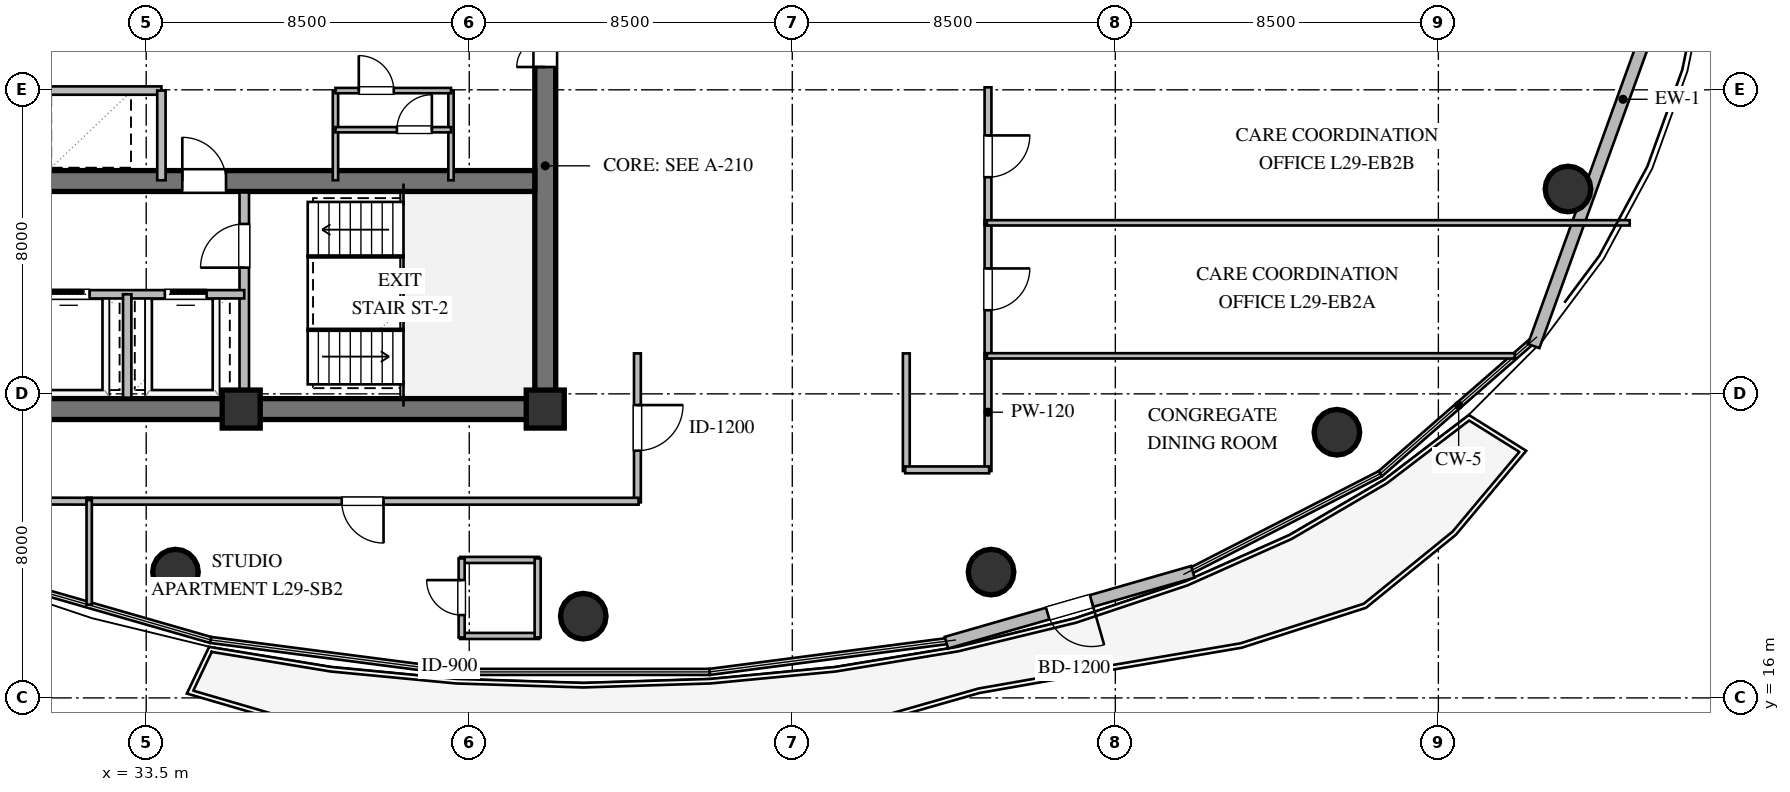
"""IFC4 building model, lengths in metres.
Left out: names, types, materials, properties, quantities, classifications, styles, units other than length and angle.
Written with IfcOpenShell. Run it as: python <this file> out.ifc"""

import sys

from ifc_helpers import new_model, si_unit, direction, frame, frame_2d, origin, origin_2d, place, context, subcontext, project, spatial, rectangle, circle, extrude, element, fill, save


model = new_model("IFC4")
c1 = context("Model", 3, precision=1e-05, world=origin(), true_north=direction((0.0, 1.0)))
c2 = subcontext(c1, "Body", "Model", "MODEL_VIEW")
j1 = project(units=[si_unit("LENGTHUNIT", "METRE"), si_unit("PLANEANGLEUNIT", "RADIAN")], contexts=[c1])
p1 = place(None, origin())
s1 = spatial("IfcSite", under=j1, at=p1, CompositionType="ELEMENT")
p2 = place(p1, origin())
s2 = spatial("IfcBuilding", under=s1, at=p2, CompositionType="ELEMENT")
p3 = place(p2, frame((0.0, 0.0, 113.4)))
s3 = spatial("IfcBuildingStorey", under=s2, at=p3, CompositionType="ELEMENT", Elevation=113.4)
p4 = place(p3, frame((21.725, 23.6, 0.0), z_axis=(0.0, 0.0, 1.0), x_axis=(1.0, 0.0, 0.0)))
e1 = element("IfcWall", 1, at=p4, inside=s3, PredefinedType="SHEAR", context=c2, shape_type="SweptSolid", body=[
    extrude(rectangle(XDim=22.55, YDim=0.55, at=frame_2d((11.275, 0.0))), origin(), (0.0, 0.0, 1.0), 3.36),
])
p5 = place(p3, frame((44.0, 23.875, 0.0), z_axis=(0.0, 0.0, 1.0), x_axis=(0.0, 1.0, 0.0)))
e2 = element("IfcWall", 2, at=p5, inside=s3, PredefinedType="SHEAR", context=c2, shape_type="SweptSolid", body=[
    extrude(rectangle(XDim=12.25, YDim=0.55, at=frame_2d((6.125, 0.0))), origin(), (0.0, 0.0, 1.0), 3.36),
])
p6 = place(p5, frame((8.725, 0.0, 0.0)))
e3 = element("IfcOpeningElement", 3, at=p6, cuts=e2, PredefinedType="OPENING", context=c2, shape_type="SweptSolid", body=[
    extrude(rectangle(XDim=1.5, YDim=2.15, at=frame_2d((0.75, 1.075))), frame((0.0, 0.285, 0.0), z_axis=(0.0, -1.0, 0.0), x_axis=(1.0, 0.0, 0.0)), (0.0, 0.0, 1.0), 0.57),
])
p7 = place(p3, frame((22.275, 29.6, 0.0), z_axis=(0.0, 0.0, 1.0), x_axis=(1.0, 0.0, 0.0)))
e4 = element("IfcWall", 4, at=p7, inside=s3, PredefinedType="SHEAR", context=c2, shape_type="SweptSolid", body=[
    extrude(rectangle(XDim=21.45, YDim=0.55, at=frame_2d((10.725, 0.0))), origin(), (0.0, 0.0, 1.0), 3.36),
])
p8 = place(p7, frame((12.175, 0.0, 0.0)))
e5 = element("IfcOpeningElement", 5, at=p8, cuts=e4, PredefinedType="OPENING", context=c2, shape_type="SweptSolid", body=[
    extrude(rectangle(XDim=1.15, YDim=2.1, at=frame_2d((0.575, 1.05))), frame((0.0, 0.285, 0.0), z_axis=(0.0, -1.0, 0.0), x_axis=(1.0, 0.0, 0.0)), (0.0, 0.0, 1.0), 0.57),
])
for number, where, z_axis, x_axis in (
    (6, (36.0, 23.6, 0.0), (0.0, 0.0, 1.0), (1.0, 0.0, 0.0)),
    (7, (44.0, 23.6, 0.0), (0.0, 0.0, 1.0), (1.0, 0.0, 0.0)),
):
    element("IfcColumn", number, at=place(p3, frame(where, z_axis=z_axis, x_axis=x_axis)), inside=s3, PredefinedType="COLUMN", context=c2, shape_type="SweptSolid", body=[
        extrude(rectangle(XDim=1.0, YDim=1.0, at=origin_2d()), origin(), (0.0, 0.0, 1.0), 3.6),
    ])
for number, where, z_axis, x_axis in (
    (8, (34.27, 19.31, 0.0), (0.0, 0.0, 1.0), (1.0, 0.0, 0.0)),
    (9, (45.0, 18.15, 0.0), (0.0, 0.0, 1.0), (1.0, 0.0, 0.0)),
    (10, (55.73, 19.31, 0.0), (0.0, 0.0, 1.0), (1.0, 0.0, 0.0)),
    (11, (64.83, 22.99, 0.0), (0.0, 0.0, 1.0), (1.0, 0.0, 0.0)),
    (12, (70.91, 29.39, 0.0), (0.0, 0.0, 1.0), (1.0, 0.0, 0.0)),
):
    element("IfcColumn", number, at=place(p3, frame(where, z_axis=z_axis, x_axis=x_axis)), inside=s3, PredefinedType="COLUMN", context=c2, shape_type="SweptSolid", body=[
        extrude(circle(Radius=0.6, at=origin_2d()), origin(), (0.0, 0.0, 1.0), 3.6),
    ])
p9 = place(p3, frame((74.708, 38.244, 0.0), z_axis=(0.0, 0.0, 1.0), x_axis=(-0.340324669139, -0.94030799187, 0.0)))
e13 = element("IfcWall", 13, at=p9, inside=s3, PredefinedType="STANDARD", context=c2, shape_type="SweptSolid", body=[
    extrude(rectangle(XDim=13.81, YDim=0.32, at=frame_2d((6.905, 0.0))), origin(), (0.0, 0.0, 1.0), 3.36),
])
p10 = place(p3, frame((61.039, 19.317, 0.0), z_axis=(0.0, 0.0, 1.0), x_axis=(-0.96106509915, -0.276322049784, 0.0)))
e14 = element("IfcWall", 14, at=p10, inside=s3, PredefinedType="STANDARD", context=c2, shape_type="SweptSolid", body=[
    extrude(rectangle(XDim=6.746, YDim=0.32, at=frame_2d((3.373, 0.0))), origin(), (0.0, 0.0, 1.0), 3.36),
])
p11 = place(p10, frame((2.773, 0.0, 0.0)))
e15 = element("IfcOpeningElement", 15, at=p11, cuts=e14, PredefinedType="OPENING", context=c2, shape_type="SweptSolid", body=[
    extrude(rectangle(XDim=1.2, YDim=2.15, at=frame_2d((0.6, 1.075))), frame((0.0, 0.17, 0.0), z_axis=(0.0, -1.0, 0.0), x_axis=(1.0, 0.0, 0.0)), (0.0, 0.0, 1.0), 0.34),
])
p12 = place(p3, frame((36.08, 23.9, 0.0), z_axis=(0.0, 0.0, 1.0), x_axis=(0.0, 1.0, 0.0)))
e16 = element("IfcWall", 16, at=p12, inside=s3, PredefinedType="SOLIDWALL", context=c2, shape_type="SweptSolid", body=[
    extrude(rectangle(XDim=5.4, YDim=0.25, at=frame_2d((2.7, 0.0))), origin(), (0.0, 0.0, 1.0), 3.36),
])
p13 = place(p12, frame((3.421, 0.0, 0.0)))
e17 = element("IfcOpeningElement", 17, at=p13, cuts=e16, PredefinedType="OPENING", context=c2, shape_type="SweptSolid", body=[
    extrude(rectangle(XDim=1.15, YDim=2.1, at=frame_2d((0.575, 1.05))), frame((0.0, 0.135, 0.0), z_axis=(0.0, -1.0, 0.0), x_axis=(1.0, 0.0, 0.0)), (0.0, 0.0, 1.0), 0.27),
])
p14 = place(p3, frame((29.92, 26.62, 0.0), z_axis=(0.0, 0.0, 1.0), x_axis=(1.0, 0.0, 0.0)))
e18 = element("IfcWall", 18, at=p14, inside=s3, PredefinedType="SOLIDWALL", context=c2, shape_type="SweptSolid", body=[
    extrude(rectangle(XDim=6.16, YDim=0.22, at=frame_2d((3.08, 0.0))), origin(), (0.0, 0.0, 1.0), 3.36),
])
p15 = place(p14, frame((0.99, 0.0, 0.0)))
e19 = element("IfcOpeningElement", 19, at=p15, cuts=e18, PredefinedType="OPENING", context=c2, shape_type="SweptSolid", body=[
    extrude(rectangle(XDim=1.1, YDim=2.1, at=frame_2d((0.55, 1.05))), frame((0.0, 0.12, 0.0), z_axis=(0.0, -1.0, 0.0), x_axis=(1.0, 0.0, 0.0)), (0.0, 0.0, 1.0), 0.24),
])
p16 = place(p14, frame((4.07, 0.0, 0.0)))
e20 = element("IfcOpeningElement", 20, at=p16, cuts=e18, PredefinedType="OPENING", context=c2, shape_type="SweptSolid", body=[
    extrude(rectangle(XDim=1.1, YDim=2.1, at=frame_2d((0.55, 1.05))), frame((0.0, 0.12, 0.0), z_axis=(0.0, -1.0, 0.0), x_axis=(1.0, 0.0, 0.0)), (0.0, 0.0, 1.0), 0.24),
])
p17 = place(p3, frame((33.0, 23.9, 0.0), z_axis=(0.0, 0.0, 1.0), x_axis=(0.0, 1.0, 0.0)))
e21 = element("IfcWall", 21, at=p17, inside=s3, PredefinedType="SOLIDWALL", context=c2, shape_type="SweptSolid", body=[
    extrude(rectangle(XDim=2.72, YDim=0.22, at=frame_2d((1.36, 0.0))), origin(), (0.0, 0.0, 1.0), 3.36),
])
p18 = place(p3, frame((26.1, 31.98, 0.0), z_axis=(0.0, 0.0, 1.0), x_axis=(1.0, 0.0, 0.0)))
e22 = element("IfcWall", 22, at=p18, inside=s3, PredefinedType="SOLIDWALL", context=c2, shape_type="SweptSolid", body=[
    extrude(rectangle(XDim=7.8, YDim=0.22, at=frame_2d((3.9, 0.0))), origin(), (0.0, 0.0, 1.0), 3.36),
])
p19 = place(p3, frame((33.9, 29.62, 0.0), z_axis=(0.0, 0.0, 1.0), x_axis=(0.0, 1.0, 0.0)))
e23 = element("IfcWall", 23, at=p19, inside=s3, PredefinedType="SOLIDWALL", context=c2, shape_type="SweptSolid", body=[
    extrude(rectangle(XDim=2.36, YDim=0.22, at=frame_2d((1.18, 0.0))), origin(), (0.0, 0.0, 1.0), 3.36),
])
for number, where, z_axis, x_axis in (
    (24, (38.48, 29.62, 0.0), (0.0, 0.0, 1.0), (0.0, 1.0, 0.0)),
    (25, (41.52, 29.62, 0.0), (0.0, 0.0, 1.0), (0.0, 1.0, 0.0)),
):
    element("IfcWall", number, at=place(p3, frame(where, z_axis=z_axis, x_axis=x_axis)), inside=s3, PredefinedType="PARTITIONING", context=c2, shape_type="SweptSolid", body=[
        extrude(rectangle(XDim=2.36, YDim=0.14, at=frame_2d((1.18, 0.0))), origin(), (0.0, 0.0, 1.0), 3.36),
    ])
p20 = place(p3, frame((38.48, 30.95, 0.0), z_axis=(0.0, 0.0, 1.0), x_axis=(1.0, 0.0, 0.0)))
e26 = element("IfcWall", 26, at=p20, inside=s3, PredefinedType="PARTITIONING", context=c2, shape_type="SweptSolid", body=[
    extrude(rectangle(XDim=3.04, YDim=0.14, at=frame_2d((1.52, 0.0))), origin(), (0.0, 0.0, 1.0), 3.36),
])
p21 = place(p20, frame((1.617, 0.0, 0.0)))
e27 = element("IfcOpeningElement", 27, at=p21, cuts=e26, PredefinedType="OPENING", context=c2, shape_type="SweptSolid", body=[
    extrude(rectangle(XDim=0.92, YDim=2.1, at=frame_2d((0.46, 1.05))), frame((0.0, 0.08, 0.0), z_axis=(0.0, -1.0, 0.0), x_axis=(1.0, 0.0, 0.0)), (0.0, 0.0, 1.0), 0.16),
])
p22 = place(p3, frame((38.48, 31.98, 0.0), z_axis=(0.0, 0.0, 1.0), x_axis=(1.0, 0.0, 0.0)))
e28 = element("IfcWall", 28, at=p22, inside=s3, PredefinedType="PARTITIONING", context=c2, shape_type="SweptSolid", body=[
    extrude(rectangle(XDim=3.04, YDim=0.14, at=frame_2d((1.52, 0.0))), origin(), (0.0, 0.0, 1.0), 3.36),
])
p23 = place(p22, frame((0.614, 0.0, 0.0)))
e29 = element("IfcOpeningElement", 29, at=p23, cuts=e28, PredefinedType="OPENING", context=c2, shape_type="SweptSolid", body=[
    extrude(rectangle(XDim=0.92, YDim=2.1, at=frame_2d((0.46, 1.05))), frame((0.0, 0.08, 0.0), z_axis=(0.0, -1.0, 0.0), x_axis=(1.0, 0.0, 0.0)), (0.0, 0.0, 1.0), 0.16),
])
p24 = place(p3, frame((41.76, 17.63, 0.0), z_axis=(0.0, 0.0, 1.0), x_axis=(1.0, 0.0, 0.0)))
e30 = element("IfcWall", 30, at=p24, inside=s3, PredefinedType="PLUMBINGWALL", context=c2, shape_type="SweptSolid", body=[
    extrude(rectangle(XDim=2.08, YDim=0.16, at=frame_2d((1.04, 0.0))), origin(), (0.0, 0.0, 1.0), 2.657),
])
p25 = place(p3, frame((41.76, 19.63, 0.0), z_axis=(0.0, 0.0, 1.0), x_axis=(1.0, 0.0, 0.0)))
e31 = element("IfcWall", 31, at=p25, inside=s3, PredefinedType="PLUMBINGWALL", context=c2, shape_type="SweptSolid", body=[
    extrude(rectangle(XDim=2.08, YDim=0.16, at=frame_2d((1.04, 0.0))), origin(), (0.0, 0.0, 1.0), 3.36),
])
p26 = place(p3, frame((41.8, 17.59, 0.0), z_axis=(0.0, 0.0, 1.0), x_axis=(0.0, 1.0, 0.0)))
e32 = element("IfcWall", 32, at=p26, inside=s3, PredefinedType="PLUMBINGWALL", context=c2, shape_type="SweptSolid", body=[
    extrude(rectangle(XDim=2.08, YDim=0.16, at=frame_2d((1.04, 0.0))), origin(), (0.0, 0.0, 1.0), 3.36),
])
p27 = place(p26, frame((0.59, 0.0, 0.0)))
e33 = element("IfcOpeningElement", 33, at=p27, cuts=e32, PredefinedType="OPENING", context=c2, shape_type="SweptSolid", body=[
    extrude(rectangle(XDim=0.92, YDim=2.1, at=frame_2d((0.46, 1.05))), frame((0.0, 0.09, 0.0), z_axis=(0.0, -1.0, 0.0), x_axis=(1.0, 0.0, 0.0)), (0.0, 0.0, 1.0), 0.18),
])
p28 = place(p3, frame((43.8, 17.59, 0.0), z_axis=(0.0, 0.0, 1.0), x_axis=(0.0, 1.0, 0.0)))
e34 = element("IfcWall", 34, at=p28, inside=s3, PredefinedType="PLUMBINGWALL", context=c2, shape_type="SweptSolid", body=[
    extrude(rectangle(XDim=2.08, YDim=0.16, at=frame_2d((1.04, 0.0))), origin(), (0.0, 0.0, 1.0), 3.36),
])
p29 = place(p3, frame((46.425, 25.065, 0.0), z_axis=(0.0, 0.0, 1.0), x_axis=(0.0, -1.0, 0.0)))
e35 = element("IfcWall", 35, at=p29, inside=s3, PredefinedType="PARTITIONING", context=c2, shape_type="SweptSolid", body=[
    extrude(rectangle(XDim=3.92, YDim=0.18, at=frame_2d((1.96, 0.0))), origin(), (0.0, 0.0, 1.0), 3.36),
])
p30 = place(p29, frame((1.36, 0.0, 0.0)))
e36 = element("IfcOpeningElement", 36, at=p30, cuts=e35, PredefinedType="OPENING", context=c2, shape_type="SweptSolid", body=[
    extrude(rectangle(XDim=1.2, YDim=2.15, at=frame_2d((0.6, 1.075))), frame((0.0, 0.1, 0.0), z_axis=(0.0, -1.0, 0.0), x_axis=(1.0, 0.0, 0.0)), (0.0, 0.0, 1.0), 0.2),
])
for number, where, z_axis, x_axis in (
    (37, (55.65, 25.065, 0.0), (0.0, 0.0, 1.0), (0.0, -1.0, 0.0)),
    (38, (53.5, 21.97, 0.0), (0.0, 0.0, 1.0), (0.0, 1.0, 0.0)),
):
    element("IfcWall", number, at=place(p3, frame(where, z_axis=z_axis, x_axis=x_axis)), inside=s3, PredefinedType="PARTITIONING", context=c2, shape_type="SweptSolid", body=[
        extrude(rectangle(XDim=3.095, YDim=0.18, at=frame_2d((1.547, 0.0))), origin(), (0.0, 0.0, 1.0), 3.36),
    ])
p31 = place(p3, frame((55.68, 22.0, 0.0), z_axis=(0.0, 0.0, 1.0), x_axis=(-1.0, 0.0, 0.0)))
e39 = element("IfcWall", 39, at=p31, inside=s3, PredefinedType="PARTITIONING", context=c2, shape_type="SweptSolid", body=[
    extrude(rectangle(XDim=2.21, YDim=0.18, at=frame_2d((1.105, 0.0))), origin(), (0.0, 0.0, 1.0), 3.36),
])
p32 = place(p3, frame((55.65, 28.565, 0.0), z_axis=(0.0, 0.0, 1.0), x_axis=(0.0, -1.0, 0.0)))
e40 = element("IfcWall", 40, at=p32, inside=s3, PredefinedType="PARTITIONING", context=c2, shape_type="SweptSolid", body=[
    extrude(rectangle(XDim=3.63, YDim=0.18, at=frame_2d((1.815, 0.0))), origin(), (0.0, 0.0, 1.0), 3.36),
])
p33 = place(p32, frame((1.265, 0.0, 0.0)))
e41 = element("IfcOpeningElement", 41, at=p33, cuts=e40, PredefinedType="OPENING", context=c2, shape_type="SweptSolid", body=[
    extrude(rectangle(XDim=1.1, YDim=2.1, at=frame_2d((0.55, 1.05))), frame((0.0, 0.1, 0.0), z_axis=(0.0, -1.0, 0.0), x_axis=(1.0, 0.0, 0.0)), (0.0, 0.0, 1.0), 0.2),
])
p34 = place(p3, frame((55.65, 32.065, 0.0), z_axis=(0.0, 0.0, 1.0), x_axis=(0.0, -1.0, 0.0)))
e42 = element("IfcWall", 42, at=p34, inside=s3, PredefinedType="PARTITIONING", context=c2, shape_type="SweptSolid", body=[
    extrude(rectangle(XDim=3.63, YDim=0.18, at=frame_2d((1.815, 0.0))), origin(), (0.0, 0.0, 1.0), 3.36),
])
p35 = place(p34, frame((1.265, 0.0, 0.0)))
e43 = element("IfcOpeningElement", 43, at=p35, cuts=e42, PredefinedType="OPENING", context=c2, shape_type="SweptSolid", body=[
    extrude(rectangle(XDim=1.1, YDim=2.1, at=frame_2d((0.55, 1.05))), frame((0.0, 0.1, 0.0), z_axis=(0.0, -1.0, 0.0), x_axis=(1.0, 0.0, 0.0)), (0.0, 0.0, 1.0), 0.2),
])
p36 = place(p3, frame((32.065, 21.175, 0.0), z_axis=(0.0, 0.0, 1.0), x_axis=(-0.999996512042, 0.002641193551, 0.0)))
e44 = element("IfcWall", 44, at=p36, inside=s3, PredefinedType="PARTITIONING", context=c2, shape_type="SweptSolid", body=[
    extrude(rectangle(XDim=7.21, YDim=0.18, at=frame_2d((3.605, 0.0))), origin(), (0.0, 0.0, 1.0), 2.657),
])
p37 = place(p36, frame((4.055, 0.0, 0.0)))
e45 = element("IfcOpeningElement", 45, at=p37, cuts=e44, PredefinedType="OPENING", context=c2, shape_type="SweptSolid", body=[
    extrude(rectangle(XDim=1.1, YDim=2.1, at=frame_2d((0.55, 1.05))), frame((0.0, 0.1, 0.0), z_axis=(0.0, -1.0, 0.0), x_axis=(1.0, 0.0, 0.0)), (0.0, 0.0, 1.0), 0.2),
])
p38 = place(p3, frame((46.455, 21.175, 0.0), z_axis=(0.0, 0.0, 1.0), x_axis=(-1.0, 0.0, 0.0)))
e46 = element("IfcWall", 46, at=p38, inside=s3, PredefinedType="PARTITIONING", context=c2, shape_type="SweptSolid", body=[
    extrude(rectangle(XDim=14.52, YDim=0.18, at=frame_2d((7.26, 0.0))), origin(), (0.0, 0.0, 1.0), 2.996),
])
p39 = place(p38, frame((6.71, 0.0, 0.0)))
e47 = element("IfcOpeningElement", 47, at=p39, cuts=e46, PredefinedType="OPENING", context=c2, shape_type="SweptSolid", body=[
    extrude(rectangle(XDim=1.1, YDim=2.1, at=frame_2d((0.55, 1.05))), frame((0.0, 0.1, 0.0), z_axis=(0.0, -1.0, 0.0), x_axis=(1.0, 0.0, 0.0)), (0.0, 0.0, 1.0), 0.2),
])
p40 = place(p3, frame((55.62, 25.0, 0.0), z_axis=(0.0, 0.0, 1.0), x_axis=(1.0, 0.0, 0.0)))
e48 = element("IfcWall", 48, at=p40, inside=s3, PredefinedType="PARTITIONING", context=c2, shape_type="SweptSolid", body=[
    extrude(rectangle(XDim=13.891, YDim=0.14, at=frame_2d((6.946, 0.0))), origin(), (0.0, 0.0, 1.0), 3.36),
])
p41 = place(p3, frame((55.62, 28.5, 0.0), z_axis=(0.0, 0.0, 1.0), x_axis=(1.0, 0.0, 0.0)))
e49 = element("IfcWall", 49, at=p41, inside=s3, PredefinedType="PARTITIONING", context=c2, shape_type="SweptSolid", body=[
    extrude(rectangle(XDim=16.915, YDim=0.14, at=frame_2d((8.458, 0.0))), origin(), (0.0, 0.0, 1.0), 2.89),
])
p42 = place(p3, frame((32.0, 21.205, 0.0), z_axis=(0.0, 0.0, 1.0), x_axis=(0.0, -1.0, 0.0)))
e50 = element("IfcWall", 50, at=p42, inside=s3, PredefinedType="PARTITIONING", context=c2, shape_type="SweptSolid", body=[
    extrude(rectangle(XDim=2.752, YDim=0.14, at=frame_2d((1.376, 0.0))), origin(), (0.0, 0.0, 1.0), 3.36),
])
p43 = place(p11, origin())
e51 = element("IfcDoor", 51, at=p43, inside=s3, OperationType="SINGLE_SWING_LEFT", PredefinedType="DOOR", context=c2, shape_type="SweptSolid", body=[
    extrude(rectangle(XDim=1.2, YDim=2.15, at=frame_2d((0.6, 1.075))), frame((0.0, 0.025, 0.0), z_axis=(0.0, -1.0, 0.0), x_axis=(1.0, 0.0, 0.0)), (0.0, 0.0, 1.0), 0.05),
])
fill(e15, e51)
p44 = place(p13, origin())
e52 = element("IfcDoor", 52, at=p44, inside=s3, OperationType="SINGLE_SWING_LEFT", PredefinedType="DOOR", context=c2, shape_type="SweptSolid", body=[
    extrude(rectangle(XDim=1.15, YDim=2.1, at=frame_2d((0.575, 1.05))), frame((0.0, 0.025, 0.0), z_axis=(0.0, -1.0, 0.0), x_axis=(1.0, 0.0, 0.0)), (0.0, 0.0, 1.0), 0.05),
])
fill(e17, e52)
p45 = place(p15, origin())
e53 = element("IfcDoor", 53, at=p45, inside=s3, OperationType="SLIDING_TO_LEFT", PredefinedType="DOOR", context=c2, shape_type="SweptSolid", body=[
    extrude(rectangle(XDim=1.1, YDim=2.1, at=frame_2d((0.55, 1.05))), frame((0.0, 0.025, 0.0), z_axis=(0.0, -1.0, 0.0), x_axis=(1.0, 0.0, 0.0)), (0.0, 0.0, 1.0), 0.05),
])
fill(e19, e53)
p46 = place(p16, origin())
e54 = element("IfcDoor", 54, at=p46, inside=s3, OperationType="SLIDING_TO_RIGHT", PredefinedType="DOOR", context=c2, shape_type="SweptSolid", body=[
    extrude(rectangle(XDim=1.1, YDim=2.1, at=frame_2d((0.55, 1.05))), frame((0.0, 0.025, 0.0), z_axis=(0.0, -1.0, 0.0), x_axis=(1.0, 0.0, 0.0)), (0.0, 0.0, 1.0), 0.05),
])
fill(e20, e54)
p47 = place(p8, origin())
e55 = element("IfcDoor", 55, at=p47, inside=s3, OperationType="SINGLE_SWING_LEFT", PredefinedType="DOOR", context=c2, shape_type="SweptSolid", body=[
    extrude(rectangle(XDim=1.15, YDim=2.1, at=frame_2d((0.575, 1.05))), frame((0.0, 0.025, 0.0), z_axis=(0.0, -1.0, 0.0), x_axis=(1.0, 0.0, 0.0)), (0.0, 0.0, 1.0), 0.05),
])
fill(e5, e55)
p48 = place(p6, origin())
e56 = element("IfcDoor", 56, at=p48, inside=s3, OperationType="DOUBLE_DOOR_SINGLE_SWING", PredefinedType="DOOR", context=c2, shape_type="SweptSolid", body=[
    extrude(rectangle(XDim=1.5, YDim=2.15, at=frame_2d((0.75, 1.075))), frame((0.0, 0.025, 0.0), z_axis=(0.0, -1.0, 0.0), x_axis=(1.0, 0.0, 0.0)), (0.0, 0.0, 1.0), 0.05),
])
fill(e3, e56)
p49 = place(p23, origin())
e57 = element("IfcDoor", 57, at=p49, inside=s3, OperationType="SINGLE_SWING_LEFT", PredefinedType="DOOR", context=c2, shape_type="SweptSolid", body=[
    extrude(rectangle(XDim=0.92, YDim=2.1, at=frame_2d((0.46, 1.05))), frame((0.0, 0.025, 0.0), z_axis=(0.0, -1.0, 0.0), x_axis=(1.0, 0.0, 0.0)), (0.0, 0.0, 1.0), 0.05),
])
fill(e29, e57)
p50 = place(p21, origin())
e58 = element("IfcDoor", 58, at=p50, inside=s3, OperationType="SINGLE_SWING_RIGHT", PredefinedType="DOOR", context=c2, shape_type="SweptSolid", body=[
    extrude(rectangle(XDim=0.92, YDim=2.1, at=frame_2d((0.46, 1.05))), frame((0.0, 0.025, 0.0), z_axis=(0.0, -1.0, 0.0), x_axis=(1.0, 0.0, 0.0)), (0.0, 0.0, 1.0), 0.05),
])
fill(e27, e58)
p51 = place(p27, origin())
e59 = element("IfcDoor", 59, at=p51, inside=s3, OperationType="SINGLE_SWING_RIGHT", PredefinedType="DOOR", context=c2, shape_type="SweptSolid", body=[
    extrude(rectangle(XDim=0.92, YDim=2.1, at=frame_2d((0.46, 1.05))), frame((0.0, 0.025, 0.0), z_axis=(0.0, -1.0, 0.0), x_axis=(1.0, 0.0, 0.0)), (0.0, 0.0, 1.0), 0.05),
])
fill(e33, e59)
p52 = place(p30, origin())
e60 = element("IfcDoor", 60, at=p52, inside=s3, OperationType="SINGLE_SWING_LEFT", PredefinedType="DOOR", context=c2, shape_type="SweptSolid", body=[
    extrude(rectangle(XDim=1.2, YDim=2.15, at=frame_2d((0.6, 1.075))), frame((0.0, 0.025, 0.0), z_axis=(0.0, -1.0, 0.0), x_axis=(1.0, 0.0, 0.0)), (0.0, 0.0, 1.0), 0.05),
])
fill(e36, e60)
p53 = place(p33, origin())
e61 = element("IfcDoor", 61, at=p53, inside=s3, OperationType="SINGLE_SWING_LEFT", PredefinedType="DOOR", context=c2, shape_type="SweptSolid", body=[
    extrude(rectangle(XDim=1.1, YDim=2.1, at=frame_2d((0.55, 1.05))), frame((0.0, 0.025, 0.0), z_axis=(0.0, -1.0, 0.0), x_axis=(1.0, 0.0, 0.0)), (0.0, 0.0, 1.0), 0.05),
])
fill(e41, e61)
p54 = place(p35, origin())
e62 = element("IfcDoor", 62, at=p54, inside=s3, OperationType="SINGLE_SWING_LEFT", PredefinedType="DOOR", context=c2, shape_type="SweptSolid", body=[
    extrude(rectangle(XDim=1.1, YDim=2.1, at=frame_2d((0.55, 1.05))), frame((0.0, 0.025, 0.0), z_axis=(0.0, -1.0, 0.0), x_axis=(1.0, 0.0, 0.0)), (0.0, 0.0, 1.0), 0.05),
])
fill(e43, e62)
p55 = place(p39, origin())
e63 = element("IfcDoor", 63, at=p55, inside=s3, OperationType="SINGLE_SWING_LEFT", PredefinedType="DOOR", context=c2, shape_type="SweptSolid", body=[
    extrude(rectangle(XDim=1.1, YDim=2.1, at=frame_2d((0.55, 1.05))), frame((0.0, 0.025, 0.0), z_axis=(0.0, -1.0, 0.0), x_axis=(1.0, 0.0, 0.0)), (0.0, 0.0, 1.0), 0.05),
])
fill(e47, e63)
save(model, sys.argv[1])
